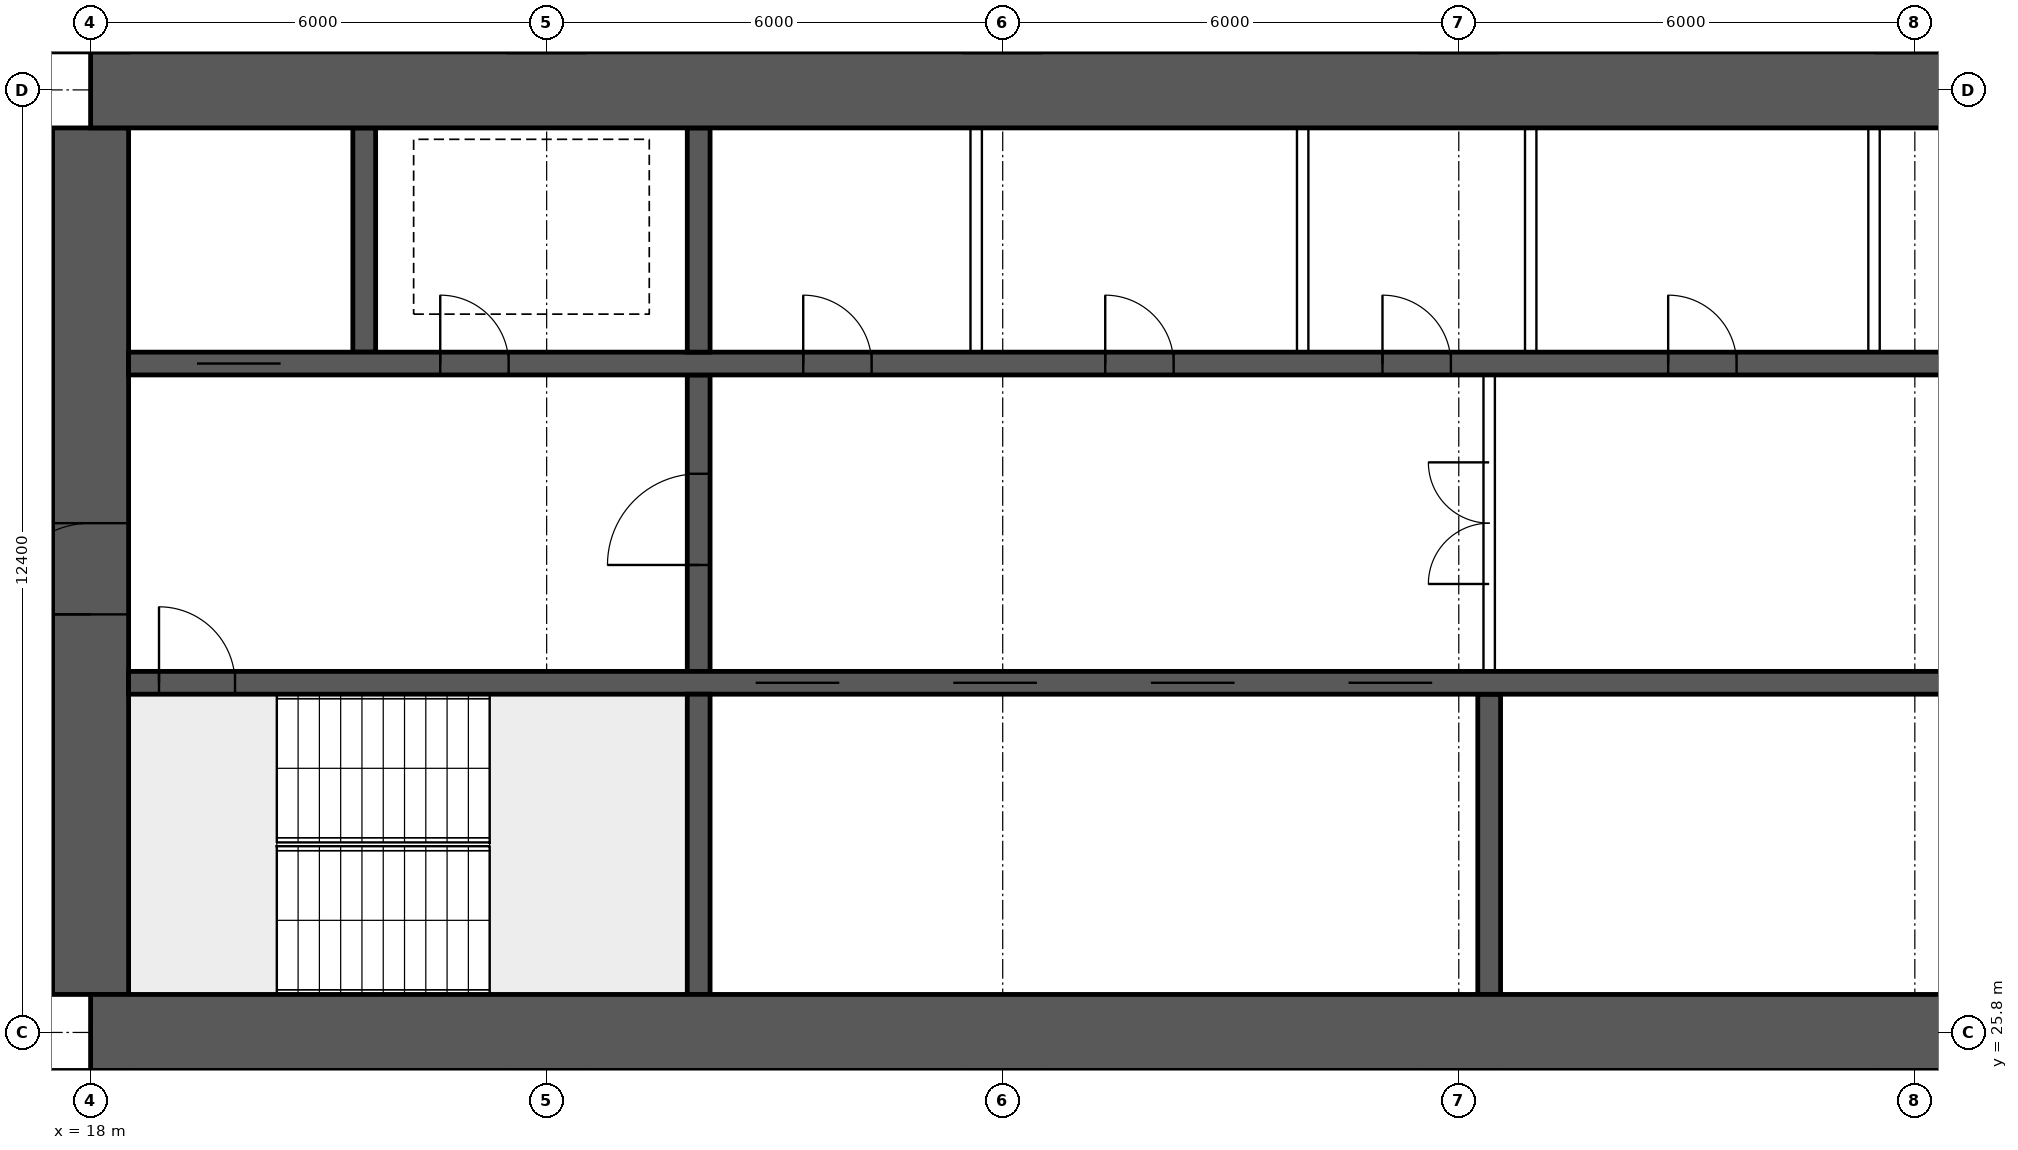
"""IFC4 building model, lengths in metres.
Left out: names, types, materials, properties, quantities, classifications, styles, units other than length and angle.
Written with IfcOpenShell. Run it as: python <this file> out.ifc"""

import sys

from ifc_helpers import new_model, si_unit, direction, frame, frame_2d, origin, place, context, subcontext, project, spatial, rectangle, extrude, element, fill, save


model = new_model("IFC4")
c1 = context("Model", 3, precision=1e-05, world=origin(), true_north=direction((0.0, 1.0)))
c2 = subcontext(c1, "Body", "Model", "MODEL_VIEW")
j1 = project(units=[si_unit("LENGTHUNIT", "METRE"), si_unit("PLANEANGLEUNIT", "RADIAN")], contexts=[c1])
p1 = place(None, origin())
s1 = spatial("IfcSite", under=j1, at=p1, CompositionType="ELEMENT")
p2 = place(p1, origin())
s2 = spatial("IfcBuilding", under=s1, at=p2, CompositionType="ELEMENT")
p3 = place(p2, frame((0.0, 0.0, 23.95)))
s3 = spatial("IfcBuildingStorey", under=s2, at=p3, CompositionType="ELEMENT", Elevation=23.95)
for number, where, z_axis, x_axis in (
    (1, (18.0, 25.8, 0.0), (0.0, 0.0, 1.0), (1.0, 0.0, 0.0)),
    (2, (18.0, 38.2, 0.0), (0.0, 0.0, 1.0), (1.0, 0.0, 0.0)),
):
    element("IfcWall", number, at=place(p3, frame(where, z_axis=z_axis, x_axis=x_axis)), inside=s3, PredefinedType="SHEAR", context=c2, shape_type="SweptSolid", body=[
        extrude(rectangle(XDim=48.0, YDim=1.0, at=frame_2d((24.0, 0.0))), origin(), (0.0, 0.0, 1.0), 3.75),
    ])
p4 = place(p3, frame((18.0, 26.3, 0.0), z_axis=(0.0, 0.0, 1.0), x_axis=(0.0, 1.0, 0.0)))
e3 = element("IfcWall", 3, at=p4, inside=s3, PredefinedType="SHEAR", context=c2, shape_type="SweptSolid", body=[
    extrude(rectangle(XDim=11.4, YDim=1.0, at=frame_2d((5.7, 0.0))), origin(), (0.0, 0.0, 1.0), 3.75),
])
p5 = place(p4, frame((5.0, 0.0, 0.0)))
e4 = element("IfcOpeningElement", 4, at=p5, cuts=e3, PredefinedType="OPENING", context=c2, shape_type="SweptSolid", body=[
    extrude(rectangle(XDim=1.2, YDim=2.1, at=frame_2d((0.6, 1.05))), frame((0.0, 0.51, 0.0), z_axis=(0.0, -1.0, 0.0), x_axis=(1.0, 0.0, 0.0)), (0.0, 0.0, 1.0), 1.02),
])
p6 = place(p3, frame((18.5, 30.4, 0.0), z_axis=(0.0, 0.0, 1.0), x_axis=(1.0, 0.0, 0.0)))
e5 = element("IfcWall", 5, at=p6, inside=s3, PredefinedType="SHEAR", context=c2, shape_type="SweptSolid", body=[
    extrude(rectangle(XDim=47.0, YDim=0.3, at=frame_2d((23.5, 0.0))), origin(), (0.0, 0.0, 1.0), 3.75),
])
p7 = place(p6, frame((0.4, 0.0, 0.0)))
e6 = element("IfcOpeningElement", 6, at=p7, cuts=e5, PredefinedType="OPENING", context=c2, shape_type="SweptSolid", body=[
    extrude(rectangle(XDim=1.0, YDim=2.1, at=frame_2d((0.5, 1.05))), frame((0.0, 0.16, 0.0), z_axis=(0.0, -1.0, 0.0), x_axis=(1.0, 0.0, 0.0)), (0.0, 0.0, 1.0), 0.32),
])
p8 = place(p6, frame((45.6, 0.0, 0.0)))
e7 = element("IfcOpeningElement", 7, at=p8, cuts=e5, PredefinedType="OPENING", context=c2, shape_type="SweptSolid", body=[
    extrude(rectangle(XDim=1.0, YDim=2.1, at=frame_2d((0.5, 1.05))), frame((0.0, 0.16, 0.0), z_axis=(0.0, -1.0, 0.0), x_axis=(1.0, 0.0, 0.0)), (0.0, 0.0, 1.0), 0.32),
])
p9 = place(p6, frame((8.25, 0.0, 0.0)))
e8 = element("IfcOpeningElement", 8, at=p9, cuts=e5, PredefinedType="OPENING", context=c2, shape_type="SweptSolid", body=[
    extrude(rectangle(XDim=1.1, YDim=2.1, at=frame_2d((0.55, 1.05))), frame((0.0, 0.16, 0.0), z_axis=(0.0, -1.0, 0.0), x_axis=(1.0, 0.0, 0.0)), (0.0, 0.0, 1.0), 0.32),
])
p10 = place(p6, frame((10.85, 0.0, 0.0)))
e9 = element("IfcOpeningElement", 9, at=p10, cuts=e5, PredefinedType="OPENING", context=c2, shape_type="SweptSolid", body=[
    extrude(rectangle(XDim=1.1, YDim=2.1, at=frame_2d((0.55, 1.05))), frame((0.0, 0.16, 0.0), z_axis=(0.0, -1.0, 0.0), x_axis=(1.0, 0.0, 0.0)), (0.0, 0.0, 1.0), 0.32),
])
p11 = place(p6, frame((13.45, 0.0, 0.0)))
e10 = element("IfcOpeningElement", 10, at=p11, cuts=e5, PredefinedType="OPENING", context=c2, shape_type="SweptSolid", body=[
    extrude(rectangle(XDim=1.1, YDim=2.1, at=frame_2d((0.55, 1.05))), frame((0.0, 0.16, 0.0), z_axis=(0.0, -1.0, 0.0), x_axis=(1.0, 0.0, 0.0)), (0.0, 0.0, 1.0), 0.32),
])
p12 = place(p6, frame((16.05, 0.0, 0.0)))
e11 = element("IfcOpeningElement", 11, at=p12, cuts=e5, PredefinedType="OPENING", context=c2, shape_type="SweptSolid", body=[
    extrude(rectangle(XDim=1.1, YDim=2.1, at=frame_2d((0.55, 1.05))), frame((0.0, 0.16, 0.0), z_axis=(0.0, -1.0, 0.0), x_axis=(1.0, 0.0, 0.0)), (0.0, 0.0, 1.0), 0.32),
])
p13 = place(p6, frame((30.117, 0.0, 0.0)))
e12 = element("IfcOpeningElement", 12, at=p13, cuts=e5, PredefinedType="OPENING", context=c2, shape_type="SweptSolid", body=[
    extrude(rectangle(XDim=1.1, YDim=2.1, at=frame_2d((0.55, 1.05))), frame((0.0, 0.16, 0.0), z_axis=(0.0, -1.0, 0.0), x_axis=(1.0, 0.0, 0.0)), (0.0, 0.0, 1.0), 0.32),
])
p14 = place(p6, frame((33.65, 0.0, 0.0)))
e13 = element("IfcOpeningElement", 13, at=p14, cuts=e5, PredefinedType="OPENING", context=c2, shape_type="SweptSolid", body=[
    extrude(rectangle(XDim=1.1, YDim=2.1, at=frame_2d((0.55, 1.05))), frame((0.0, 0.16, 0.0), z_axis=(0.0, -1.0, 0.0), x_axis=(1.0, 0.0, 0.0)), (0.0, 0.0, 1.0), 0.32),
])
p15 = place(p6, frame((37.183, 0.0, 0.0)))
e14 = element("IfcOpeningElement", 14, at=p15, cuts=e5, PredefinedType="OPENING", context=c2, shape_type="SweptSolid", body=[
    extrude(rectangle(XDim=1.1, YDim=2.1, at=frame_2d((0.55, 1.05))), frame((0.0, 0.16, 0.0), z_axis=(0.0, -1.0, 0.0), x_axis=(1.0, 0.0, 0.0)), (0.0, 0.0, 1.0), 0.32),
])
p16 = place(p3, frame((18.5, 34.6, 0.0), z_axis=(0.0, 0.0, 1.0), x_axis=(1.0, 0.0, 0.0)))
e15 = element("IfcWall", 15, at=p16, inside=s3, PredefinedType="SHEAR", context=c2, shape_type="SweptSolid", body=[
    extrude(rectangle(XDim=47.0, YDim=0.3, at=frame_2d((23.5, 0.0))), origin(), (0.0, 0.0, 1.0), 3.75),
])
p17 = place(p16, frame((0.9, 0.0, 0.0)))
e16 = element("IfcOpeningElement", 16, at=p17, cuts=e15, PredefinedType="OPENING", context=c2, shape_type="SweptSolid", body=[
    extrude(rectangle(XDim=1.1, YDim=2.1, at=frame_2d((0.55, 1.05))), frame((0.0, 0.16, 0.0), z_axis=(0.0, -1.0, 0.0), x_axis=(1.0, 0.0, 0.0)), (0.0, 0.0, 1.0), 0.32),
])
p18 = place(p16, frame((45.0, 0.0, 0.0)))
e17 = element("IfcOpeningElement", 17, at=p18, cuts=e15, PredefinedType="OPENING", context=c2, shape_type="SweptSolid", body=[
    extrude(rectangle(XDim=1.1, YDim=2.1, at=frame_2d((0.55, 1.05))), frame((0.0, 0.16, 0.0), z_axis=(0.0, -1.0, 0.0), x_axis=(1.0, 0.0, 0.0)), (0.0, 0.0, 1.0), 0.32),
])
p19 = place(p16, frame((4.1, 0.0, 0.0)))
e18 = element("IfcOpeningElement", 18, at=p19, cuts=e15, PredefinedType="OPENING", context=c2, shape_type="SweptSolid", body=[
    extrude(rectangle(XDim=0.9, YDim=2.1, at=frame_2d((0.45, 1.05))), frame((0.0, 0.16, 0.0), z_axis=(0.0, -1.0, 0.0), x_axis=(1.0, 0.0, 0.0)), (0.0, 0.0, 1.0), 0.32),
])
p20 = place(p16, frame((42.0, 0.0, 0.0)))
e19 = element("IfcOpeningElement", 19, at=p20, cuts=e15, PredefinedType="OPENING", context=c2, shape_type="SweptSolid", body=[
    extrude(rectangle(XDim=0.9, YDim=2.1, at=frame_2d((0.45, 1.05))), frame((0.0, 0.16, 0.0), z_axis=(0.0, -1.0, 0.0), x_axis=(1.0, 0.0, 0.0)), (0.0, 0.0, 1.0), 0.32),
])
p21 = place(p16, frame((8.875, 0.0, 0.0)))
e20 = element("IfcOpeningElement", 20, at=p21, cuts=e15, PredefinedType="OPENING", context=c2, shape_type="SweptSolid", body=[
    extrude(rectangle(XDim=0.9, YDim=2.1, at=frame_2d((0.45, 1.05))), frame((0.0, 0.16, 0.0), z_axis=(0.0, -1.0, 0.0), x_axis=(1.0, 0.0, 0.0)), (0.0, 0.0, 1.0), 0.32),
])
p22 = place(p16, frame((12.849, 0.0, 0.0)))
e21 = element("IfcOpeningElement", 21, at=p22, cuts=e15, PredefinedType="OPENING", context=c2, shape_type="SweptSolid", body=[
    extrude(rectangle(XDim=0.9, YDim=2.1, at=frame_2d((0.45, 1.05))), frame((0.0, 0.16, 0.0), z_axis=(0.0, -1.0, 0.0), x_axis=(1.0, 0.0, 0.0)), (0.0, 0.0, 1.0), 0.32),
])
p23 = place(p16, frame((16.496, 0.0, 0.0)))
e22 = element("IfcOpeningElement", 22, at=p23, cuts=e15, PredefinedType="OPENING", context=c2, shape_type="SweptSolid", body=[
    extrude(rectangle(XDim=0.9, YDim=2.1, at=frame_2d((0.45, 1.05))), frame((0.0, 0.16, 0.0), z_axis=(0.0, -1.0, 0.0), x_axis=(1.0, 0.0, 0.0)), (0.0, 0.0, 1.0), 0.32),
])
p24 = place(p16, frame((20.255, 0.0, 0.0)))
e23 = element("IfcOpeningElement", 23, at=p24, cuts=e15, PredefinedType="OPENING", context=c2, shape_type="SweptSolid", body=[
    extrude(rectangle(XDim=0.9, YDim=2.1, at=frame_2d((0.45, 1.05))), frame((0.0, 0.16, 0.0), z_axis=(0.0, -1.0, 0.0), x_axis=(1.0, 0.0, 0.0)), (0.0, 0.0, 1.0), 0.32),
])
p25 = place(p16, frame((24.661, 0.0, 0.0)))
e24 = element("IfcOpeningElement", 24, at=p25, cuts=e15, PredefinedType="OPENING", context=c2, shape_type="SweptSolid", body=[
    extrude(rectangle(XDim=0.9, YDim=2.1, at=frame_2d((0.45, 1.05))), frame((0.0, 0.16, 0.0), z_axis=(0.0, -1.0, 0.0), x_axis=(1.0, 0.0, 0.0)), (0.0, 0.0, 1.0), 0.32),
])
p26 = place(p16, frame((27.458, 0.0, 0.0)))
e25 = element("IfcOpeningElement", 25, at=p26, cuts=e15, PredefinedType="OPENING", context=c2, shape_type="SweptSolid", body=[
    extrude(rectangle(XDim=0.9, YDim=2.1, at=frame_2d((0.45, 1.05))), frame((0.0, 0.16, 0.0), z_axis=(0.0, -1.0, 0.0), x_axis=(1.0, 0.0, 0.0)), (0.0, 0.0, 1.0), 0.32),
])
p27 = place(p16, frame((29.831, 0.0, 0.0)))
e26 = element("IfcOpeningElement", 26, at=p27, cuts=e15, PredefinedType="OPENING", context=c2, shape_type="SweptSolid", body=[
    extrude(rectangle(XDim=0.9, YDim=2.1, at=frame_2d((0.45, 1.05))), frame((0.0, 0.16, 0.0), z_axis=(0.0, -1.0, 0.0), x_axis=(1.0, 0.0, 0.0)), (0.0, 0.0, 1.0), 0.32),
])
p28 = place(p16, frame((33.68, 0.0, 0.0)))
e27 = element("IfcOpeningElement", 27, at=p28, cuts=e15, PredefinedType="OPENING", context=c2, shape_type="SweptSolid", body=[
    extrude(rectangle(XDim=0.9, YDim=2.1, at=frame_2d((0.45, 1.05))), frame((0.0, 0.16, 0.0), z_axis=(0.0, -1.0, 0.0), x_axis=(1.0, 0.0, 0.0)), (0.0, 0.0, 1.0), 0.32),
])
p29 = place(p16, frame((37.429, 0.0, 0.0)))
e28 = element("IfcOpeningElement", 28, at=p29, cuts=e15, PredefinedType="OPENING", context=c2, shape_type="SweptSolid", body=[
    extrude(rectangle(XDim=0.9, YDim=2.1, at=frame_2d((0.45, 1.05))), frame((0.0, 0.16, 0.0), z_axis=(0.0, -1.0, 0.0), x_axis=(1.0, 0.0, 0.0)), (0.0, 0.0, 1.0), 0.32),
])
p30 = place(p3, frame((26.0, 26.3, 0.0), z_axis=(0.0, 0.0, 1.0), x_axis=(0.0, 1.0, 0.0)))
e29 = element("IfcWall", 29, at=p30, inside=s3, PredefinedType="SHEAR", context=c2, shape_type="SweptSolid", body=[
    extrude(rectangle(XDim=3.95, YDim=0.3, at=frame_2d((1.975, 0.0))), origin(), (0.0, 0.0, 1.0), 3.75),
])
p31 = place(p3, frame((26.0, 30.55, 0.0), z_axis=(0.0, 0.0, 1.0), x_axis=(0.0, 1.0, 0.0)))
e30 = element("IfcWall", 30, at=p31, inside=s3, PredefinedType="SHEAR", context=c2, shape_type="SweptSolid", body=[
    extrude(rectangle(XDim=3.9, YDim=0.3, at=frame_2d((1.95, 0.0))), origin(), (0.0, 0.0, 1.0), 3.75),
])
p32 = place(p31, frame((1.4, 0.0, 0.0)))
e31 = element("IfcOpeningElement", 31, at=p32, cuts=e30, PredefinedType="OPENING", context=c2, shape_type="SweptSolid", body=[
    extrude(rectangle(XDim=1.2, YDim=2.1, at=frame_2d((0.6, 1.05))), frame((0.0, 0.16, 0.0), z_axis=(0.0, -1.0, 0.0), x_axis=(1.0, 0.0, 0.0)), (0.0, 0.0, 1.0), 0.32),
])
for number, where, z_axis, x_axis in (
    (32, (21.6, 34.75, 0.0), (0.0, 0.0, 1.0), (0.0, 1.0, 0.0)),
    (33, (26.0, 34.75, 0.0), (0.0, 0.0, 1.0), (0.0, 1.0, 0.0)),
):
    element("IfcWall", number, at=place(p3, frame(where, z_axis=z_axis, x_axis=x_axis)), inside=s3, PredefinedType="SHEAR", context=c2, shape_type="SweptSolid", body=[
        extrude(rectangle(XDim=2.95, YDim=0.3, at=frame_2d((1.475, 0.0))), origin(), (0.0, 0.0, 1.0), 3.75),
    ])
p33 = place(p3, frame((36.4, 26.3, 0.0), z_axis=(0.0, 0.0, 1.0), x_axis=(0.0, 1.0, 0.0)))
e34 = element("IfcWall", 34, at=p33, inside=s3, PredefinedType="SHEAR", context=c2, shape_type="SweptSolid", body=[
    extrude(rectangle(XDim=3.95, YDim=0.3, at=frame_2d((1.975, 0.0))), origin(), (0.0, 0.0, 1.0), 3.75),
])
p34 = place(p3, frame((36.4, 30.55, 0.0), z_axis=(0.0, 0.0, 1.0), x_axis=(0.0, 1.0, 0.0)))
e35 = element("IfcWall", 35, at=p34, inside=s3, PredefinedType="SOLIDWALL", context=c2, shape_type="SweptSolid", body=[
    extrude(rectangle(XDim=3.9, YDim=0.15, at=frame_2d((1.95, 0.0))), origin(), (0.0, 0.0, 1.0), 3.5),
])
p35 = place(p34, frame((1.15, 0.0, 0.0)))
e36 = element("IfcOpeningElement", 36, at=p35, cuts=e35, PredefinedType="OPENING", context=c2, shape_type="SweptSolid", body=[
    extrude(rectangle(XDim=1.6, YDim=2.1, at=frame_2d((0.8, 1.05))), frame((0.0, 0.085, 0.0), z_axis=(0.0, -1.0, 0.0), x_axis=(1.0, 0.0, 0.0)), (0.0, 0.0, 1.0), 0.17),
])
for number, where, z_axis, x_axis in (
    (37, (29.651, 34.75, 0.0), (0.0, 0.0, 1.0), (0.0, 1.0, 0.0)),
    (38, (33.946, 34.75, 0.0), (0.0, 0.0, 1.0), (0.0, 1.0, 0.0)),
    (39, (36.946, 34.75, 0.0), (0.0, 0.0, 1.0), (0.0, 1.0, 0.0)),
    (40, (41.463, 34.75, 0.0), (0.0, 0.0, 1.0), (0.0, 1.0, 0.0)),
):
    element("IfcWall", number, at=place(p3, frame(where, z_axis=z_axis, x_axis=x_axis)), inside=s3, PredefinedType="SOLIDWALL", context=c2, shape_type="SweptSolid", body=[
        extrude(rectangle(XDim=2.95, YDim=0.15, at=frame_2d((1.475, 0.0))), origin(), (0.0, 0.0, 1.0), 3.5),
    ])
for number, where, z_axis, x_axis in (
    (41, (21.725, 14.9, 0.0), (0.0, 0.0, 1.0), (0.0, 1.0, 0.0)),
    (42, (33.5, 14.9, 0.0), (0.0, 0.0, 1.0), (0.0, 1.0, 0.0)),
    (43, (38.79, 14.9, 0.0), (0.0, 0.0, 1.0), (0.0, 1.0, 0.0)),
):
    element("IfcWall", number, at=place(p3, frame(where, z_axis=z_axis, x_axis=x_axis)), inside=s3, PredefinedType="PARTITIONING", context=c2, shape_type="SweptSolid", body=[
        extrude(rectangle(XDim=10.4, YDim=0.15, at=frame_2d((5.2, 0.0))), origin(), (0.0, 0.0, 1.0), 3.5),
    ])
p36 = place(p35, origin())
e44 = element("IfcDoor", 44, at=p36, inside=s3, OperationType="DOUBLE_DOOR_SINGLE_SWING", PredefinedType="DOOR", context=c2, shape_type="SweptSolid", body=[
    extrude(rectangle(XDim=1.6, YDim=2.1, at=frame_2d((0.8, 1.05))), frame((0.0, 0.025, 0.0), z_axis=(0.0, -1.0, 0.0), x_axis=(1.0, 0.0, 0.0)), (0.0, 0.0, 1.0), 0.05),
])
fill(e36, e44)
p37 = place(p5, origin())
e45 = element("IfcDoor", 45, at=p37, inside=s3, OperationType="SINGLE_SWING_LEFT", PredefinedType="DOOR", context=c2, shape_type="SweptSolid", body=[
    extrude(rectangle(XDim=1.2, YDim=2.1, at=frame_2d((0.6, 1.05))), frame((0.0, 0.025, 0.0), z_axis=(0.0, -1.0, 0.0), x_axis=(1.0, 0.0, 0.0)), (0.0, 0.0, 1.0), 0.05),
])
fill(e4, e45)
p38 = place(p7, origin())
e46 = element("IfcDoor", 46, at=p38, inside=s3, OperationType="SINGLE_SWING_LEFT", PredefinedType="DOOR", context=c2, shape_type="SweptSolid", body=[
    extrude(rectangle(XDim=1.0, YDim=2.1, at=frame_2d((0.5, 1.05))), frame((0.0, 0.025, 0.0), z_axis=(0.0, -1.0, 0.0), x_axis=(1.0, 0.0, 0.0)), (0.0, 0.0, 1.0), 0.05),
])
fill(e6, e46)
p39 = place(p17, origin())
e47 = element("IfcDoor", 47, at=p39, inside=s3, OperationType="DOUBLE_DOOR_SLIDING", PredefinedType="DOOR", context=c2, shape_type="SweptSolid", body=[
    extrude(rectangle(XDim=1.1, YDim=2.1, at=frame_2d((0.55, 1.05))), frame((0.0, 0.025, 0.0), z_axis=(0.0, -1.0, 0.0), x_axis=(1.0, 0.0, 0.0)), (0.0, 0.0, 1.0), 0.05),
])
fill(e16, e47)
p40 = place(p19, origin())
e48 = element("IfcDoor", 48, at=p40, inside=s3, OperationType="SINGLE_SWING_LEFT", PredefinedType="DOOR", context=c2, shape_type="SweptSolid", body=[
    extrude(rectangle(XDim=0.9, YDim=2.1, at=frame_2d((0.45, 1.05))), frame((0.0, 0.025, 0.0), z_axis=(0.0, -1.0, 0.0), x_axis=(1.0, 0.0, 0.0)), (0.0, 0.0, 1.0), 0.05),
])
fill(e18, e48)
p41 = place(p32, origin())
e49 = element("IfcDoor", 49, at=p41, inside=s3, OperationType="SINGLE_SWING_LEFT", PredefinedType="DOOR", context=c2, shape_type="SweptSolid", body=[
    extrude(rectangle(XDim=1.2, YDim=2.1, at=frame_2d((0.6, 1.05))), frame((0.0, 0.025, 0.0), z_axis=(0.0, -1.0, 0.0), x_axis=(1.0, 0.0, 0.0)), (0.0, 0.0, 1.0), 0.05),
])
fill(e31, e49)
p42 = place(p21, origin())
e50 = element("IfcDoor", 50, at=p42, inside=s3, OperationType="SINGLE_SWING_LEFT", PredefinedType="DOOR", context=c2, shape_type="SweptSolid", body=[
    extrude(rectangle(XDim=0.9, YDim=2.1, at=frame_2d((0.45, 1.05))), frame((0.0, 0.025, 0.0), z_axis=(0.0, -1.0, 0.0), x_axis=(1.0, 0.0, 0.0)), (0.0, 0.0, 1.0), 0.05),
])
fill(e20, e50)
p43 = place(p22, origin())
e51 = element("IfcDoor", 51, at=p43, inside=s3, OperationType="SINGLE_SWING_LEFT", PredefinedType="DOOR", context=c2, shape_type="SweptSolid", body=[
    extrude(rectangle(XDim=0.9, YDim=2.1, at=frame_2d((0.45, 1.05))), frame((0.0, 0.025, 0.0), z_axis=(0.0, -1.0, 0.0), x_axis=(1.0, 0.0, 0.0)), (0.0, 0.0, 1.0), 0.05),
])
fill(e21, e51)
p44 = place(p23, origin())
e52 = element("IfcDoor", 52, at=p44, inside=s3, OperationType="SINGLE_SWING_LEFT", PredefinedType="DOOR", context=c2, shape_type="SweptSolid", body=[
    extrude(rectangle(XDim=0.9, YDim=2.1, at=frame_2d((0.45, 1.05))), frame((0.0, 0.025, 0.0), z_axis=(0.0, -1.0, 0.0), x_axis=(1.0, 0.0, 0.0)), (0.0, 0.0, 1.0), 0.05),
])
fill(e22, e52)
p45 = place(p24, origin())
e53 = element("IfcDoor", 53, at=p45, inside=s3, OperationType="SINGLE_SWING_LEFT", PredefinedType="DOOR", context=c2, shape_type="SweptSolid", body=[
    extrude(rectangle(XDim=0.9, YDim=2.1, at=frame_2d((0.45, 1.05))), frame((0.0, 0.025, 0.0), z_axis=(0.0, -1.0, 0.0), x_axis=(1.0, 0.0, 0.0)), (0.0, 0.0, 1.0), 0.05),
])
fill(e23, e53)
p46 = place(p9, origin())
e54 = element("IfcDoor", 54, at=p46, inside=s3, OperationType="DOUBLE_DOOR_SLIDING", PredefinedType="DOOR", context=c2, shape_type="SweptSolid", body=[
    extrude(rectangle(XDim=1.1, YDim=2.1, at=frame_2d((0.55, 1.05))), frame((0.0, 0.025, 0.0), z_axis=(0.0, -1.0, 0.0), x_axis=(1.0, 0.0, 0.0)), (0.0, 0.0, 1.0), 0.05),
])
fill(e8, e54)
p47 = place(p10, origin())
e55 = element("IfcDoor", 55, at=p47, inside=s3, OperationType="DOUBLE_DOOR_SLIDING", PredefinedType="DOOR", context=c2, shape_type="SweptSolid", body=[
    extrude(rectangle(XDim=1.1, YDim=2.1, at=frame_2d((0.55, 1.05))), frame((0.0, 0.025, 0.0), z_axis=(0.0, -1.0, 0.0), x_axis=(1.0, 0.0, 0.0)), (0.0, 0.0, 1.0), 0.05),
])
fill(e9, e55)
p48 = place(p11, origin())
e56 = element("IfcDoor", 56, at=p48, inside=s3, OperationType="DOUBLE_DOOR_SLIDING", PredefinedType="DOOR", context=c2, shape_type="SweptSolid", body=[
    extrude(rectangle(XDim=1.1, YDim=2.1, at=frame_2d((0.55, 1.05))), frame((0.0, 0.025, 0.0), z_axis=(0.0, -1.0, 0.0), x_axis=(1.0, 0.0, 0.0)), (0.0, 0.0, 1.0), 0.05),
])
fill(e10, e56)
p49 = place(p12, origin())
e57 = element("IfcDoor", 57, at=p49, inside=s3, OperationType="DOUBLE_DOOR_SLIDING", PredefinedType="DOOR", context=c2, shape_type="SweptSolid", body=[
    extrude(rectangle(XDim=1.1, YDim=2.1, at=frame_2d((0.55, 1.05))), frame((0.0, 0.025, 0.0), z_axis=(0.0, -1.0, 0.0), x_axis=(1.0, 0.0, 0.0)), (0.0, 0.0, 1.0), 0.05),
])
fill(e11, e57)
save(model, sys.argv[1])
